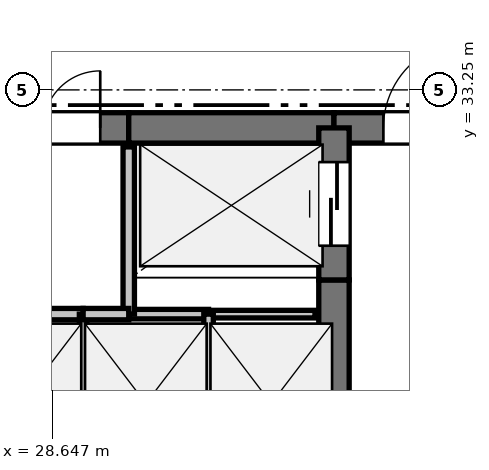
"""IFC4 building model, lengths in metres.
Left out: names, types, materials, properties, quantities, classifications, styles, units other than length and angle.
Written with IfcOpenShell. Run it as: python <this file> out.ifc"""

import sys

from ifc_helpers import new_model, si_unit, direction, frame, frame_2d, origin, place, context, subcontext, project, spatial, rectangle, extrude, element, fill, save


model = new_model("IFC4")
c1 = context("Model", 3, precision=1e-05, world=origin(), true_north=direction((0.0, 1.0)))
c2 = subcontext(c1, "Body", "Model", "MODEL_VIEW")
j1 = project(units=[si_unit("LENGTHUNIT", "METRE"), si_unit("PLANEANGLEUNIT", "RADIAN")], contexts=[c1])
p1 = place(None, origin())
s1 = spatial("IfcSite", under=j1, at=p1, CompositionType="ELEMENT")
p2 = place(p1, origin())
s2 = spatial("IfcBuilding", under=s1, at=p2, CompositionType="ELEMENT")
p3 = place(p2, frame((0.0, 0.0, 99.9)))
s3 = spatial("IfcBuildingStorey", under=s2, at=p3, CompositionType="ELEMENT", Elevation=99.9)
p4 = place(p3, frame((27.4, 32.75, 0.0), z_axis=(0.0, 0.0, 1.0), x_axis=(1.0, 0.0, 0.0)))
e1 = element("IfcWall", 1, at=p4, inside=s3, PredefinedType="SHEAR", context=c2, shape_type="SweptSolid", body=[
    extrude(rectangle(XDim=2.25, YDim=0.4, at=frame_2d((1.125, 0.0))), origin(), (0.0, 0.0, 1.0), 3.05),
])
p5 = place(p4, frame((0.375, 0.0, 0.0)))
e2 = element("IfcOpeningElement", 2, at=p5, cuts=e1, PredefinedType="OPENING", context=c2, shape_type="SweptSolid", body=[
    extrude(rectangle(XDim=1.5, YDim=2.2, at=frame_2d((0.75, 1.1))), frame((0.0, 0.21, 0.0), z_axis=(0.0, -1.0, 0.0), x_axis=(1.0, 0.0, 0.0)), (0.0, 0.0, 1.0), 0.42),
])
p6 = place(p3, frame((29.65, 32.75, 0.0), z_axis=(0.0, 0.0, 1.0), x_axis=(1.0, 0.0, 0.0)))
e3 = element("IfcWall", 3, at=p6, inside=s3, PredefinedType="SHEAR", context=c2, shape_type="SweptSolid", body=[
    extrude(rectangle(XDim=2.7, YDim=0.4, at=frame_2d((1.35, 0.0))), origin(), (0.0, 0.0, 1.0), 3.05),
])
p7 = place(p3, frame((32.35, 32.75, 0.0), z_axis=(0.0, 0.0, 1.0), x_axis=(1.0, 0.0, 0.0)))
e4 = element("IfcWall", 4, at=p7, inside=s3, PredefinedType="SHEAR", context=c2, shape_type="SweptSolid", body=[
    extrude(rectangle(XDim=3.45, YDim=0.4, at=frame_2d((1.725, 0.0))), origin(), (0.0, 0.0, 1.0), 3.05),
])
p8 = place(p7, frame((0.65, 0.0, 0.0)))
e5 = element("IfcOpeningElement", 5, at=p8, cuts=e4, PredefinedType="OPENING", context=c2, shape_type="SweptSolid", body=[
    extrude(rectangle(XDim=1.15, YDim=2.15, at=frame_2d((0.575, 1.075))), frame((0.0, 0.21, 0.0), z_axis=(0.0, -1.0, 0.0), x_axis=(1.0, 0.0, 0.0)), (0.0, 0.0, 1.0), 0.42),
])
p9 = place(p3, frame((32.35, 27.95, 0.0), z_axis=(0.0, 0.0, 1.0), x_axis=(0.0, 1.0, 0.0)))
e6 = element("IfcWall", 6, at=p9, inside=s3, PredefinedType="SHEAR", context=c2, shape_type="SweptSolid", body=[
    extrude(rectangle(XDim=2.8, YDim=0.4, at=frame_2d((1.4, 0.0))), origin(), (0.0, 0.0, 1.0), 3.05),
])
p10 = place(p3, frame((32.35, 30.75, 0.0), z_axis=(0.0, 0.0, 1.0), x_axis=(0.0, 1.0, 0.0)))
e7 = element("IfcWall", 7, at=p10, inside=s3, PredefinedType="SHEAR", context=c2, shape_type="SweptSolid", body=[
    extrude(rectangle(XDim=2.0, YDim=0.4, at=frame_2d((1.0, 0.0))), origin(), (0.0, 0.0, 1.0), 3.05),
])
p11 = place(p10, frame((0.45, 0.0, 0.0)))
e8 = element("IfcOpeningElement", 8, at=p11, cuts=e7, PredefinedType="OPENING", context=c2, shape_type="SweptSolid", body=[
    extrude(rectangle(XDim=1.1, YDim=2.15, at=frame_2d((0.55, 1.075))), frame((0.0, 0.21, 0.0), z_axis=(0.0, -1.0, 0.0), x_axis=(1.0, 0.0, 0.0)), (0.0, 0.0, 1.0), 0.42),
])
p12 = place(p3, frame((32.1, 30.3, 0.0), z_axis=(0.0, 0.0, 1.0), x_axis=(-1.0, 0.0, 0.0)))
e9 = element("IfcWall", 9, at=p12, inside=s3, PredefinedType="PARTITIONING", context=c2, shape_type="SweptSolid", body=[
    extrude(rectangle(XDim=1.4, YDim=0.1, at=frame_2d((0.7, 0.0))), origin(), (0.0, 0.0, 1.0), 3.05),
])
p13 = place(p3, frame((30.7, 30.3, 0.0), z_axis=(0.0, 0.0, 1.0), x_axis=(-1.0, 0.0, 0.0)))
e10 = element("IfcWall", 10, at=p13, inside=s3, PredefinedType="PARTITIONING", context=c2, shape_type="SweptSolid", body=[
    extrude(rectangle(XDim=1.05, YDim=0.125, at=frame_2d((0.525, 0.0))), origin(), (0.0, 0.0, 1.0), 3.05),
])
p14 = place(p3, frame((29.65, 30.3, 0.0), z_axis=(0.0, 0.0, 1.0), x_axis=(0.0, 1.0, 0.0)))
e11 = element("IfcWall", 11, at=p14, inside=s3, PredefinedType="PARTITIONING", context=c2, shape_type="SweptSolid", body=[
    extrude(rectangle(XDim=2.2, YDim=0.15, at=frame_2d((1.1, 0.0))), origin(), (0.0, 0.0, 1.0), 3.05),
])
p15 = place(p3, frame((27.4, 30.3, 0.0), z_axis=(0.0, 0.0, 1.0), x_axis=(1.0, 0.0, 0.0)))
e12 = element("IfcWall", 12, at=p15, inside=s3, PredefinedType="PARTITIONING", context=c2, shape_type="SweptSolid", body=[
    extrude(rectangle(XDim=1.65, YDim=0.15, at=frame_2d((0.825, 0.0))), origin(), (0.0, 0.0, 1.0), 3.05),
])
p16 = place(p3, frame((29.05, 30.3, 0.0), z_axis=(0.0, 0.0, 1.0), x_axis=(0.0, -1.0, 0.0)))
e13 = element("IfcWall", 13, at=p16, inside=s3, PredefinedType="PARTITIONING", context=c2, shape_type="SweptSolid", body=[
    extrude(rectangle(XDim=2.2, YDim=0.1, at=frame_2d((1.1, 0.0))), origin(), (0.0, 0.0, 1.0), 3.05),
])
p17 = place(p3, frame((29.05, 30.3, 0.0), z_axis=(0.0, 0.0, 1.0), x_axis=(1.0, 0.0, 0.0)))
e14 = element("IfcWall", 14, at=p17, inside=s3, PredefinedType="PARTITIONING", context=c2, shape_type="SweptSolid", body=[
    extrude(rectangle(XDim=0.6, YDim=0.15, at=frame_2d((0.3, 0.0))), origin(), (0.0, 0.0, 1.0), 3.05),
])
p18 = place(p3, frame((30.7, 30.3, 0.0), z_axis=(0.0, 0.0, 1.0), x_axis=(0.0, -1.0, 0.0)))
e15 = element("IfcWall", 15, at=p18, inside=s3, PredefinedType="PARTITIONING", context=c2, shape_type="SweptSolid", body=[
    extrude(rectangle(XDim=2.2, YDim=0.125, at=frame_2d((1.1, 0.0))), origin(), (0.0, 0.0, 1.0), 3.05),
])
p19 = place(p11, origin())
e16 = element("IfcDoor", 16, at=p19, inside=s3, OperationType="SLIDING_TO_LEFT", PredefinedType="DOOR", context=c2, shape_type="SweptSolid", body=[
    extrude(rectangle(XDim=1.1, YDim=2.15, at=frame_2d((0.55, 1.075))), frame((0.0, 0.025, 0.0), z_axis=(0.0, -1.0, 0.0), x_axis=(1.0, 0.0, 0.0)), (0.0, 0.0, 1.0), 0.05),
])
fill(e8, e16)
p20 = place(p8, origin())
e17 = element("IfcDoor", 17, at=p20, inside=s3, OperationType="SINGLE_SWING_RIGHT", PredefinedType="DOOR", context=c2, shape_type="SweptSolid", body=[
    extrude(rectangle(XDim=1.15, YDim=2.15, at=frame_2d((0.575, 1.075))), frame((0.0, 0.025, 0.0), z_axis=(0.0, -1.0, 0.0), x_axis=(1.0, 0.0, 0.0)), (0.0, 0.0, 1.0), 0.05),
])
fill(e5, e17)
p21 = place(p5, origin())
e18 = element("IfcDoor", 18, at=p21, inside=s3, OperationType="DOUBLE_DOOR_SINGLE_SWING", PredefinedType="DOOR", context=c2, shape_type="SweptSolid", body=[
    extrude(rectangle(XDim=1.5, YDim=2.2, at=frame_2d((0.75, 1.1))), frame((0.0, 0.025, 0.0), z_axis=(0.0, -1.0, 0.0), x_axis=(1.0, 0.0, 0.0)), (0.0, 0.0, 1.0), 0.05),
])
fill(e2, e18)
save(model, sys.argv[1])
